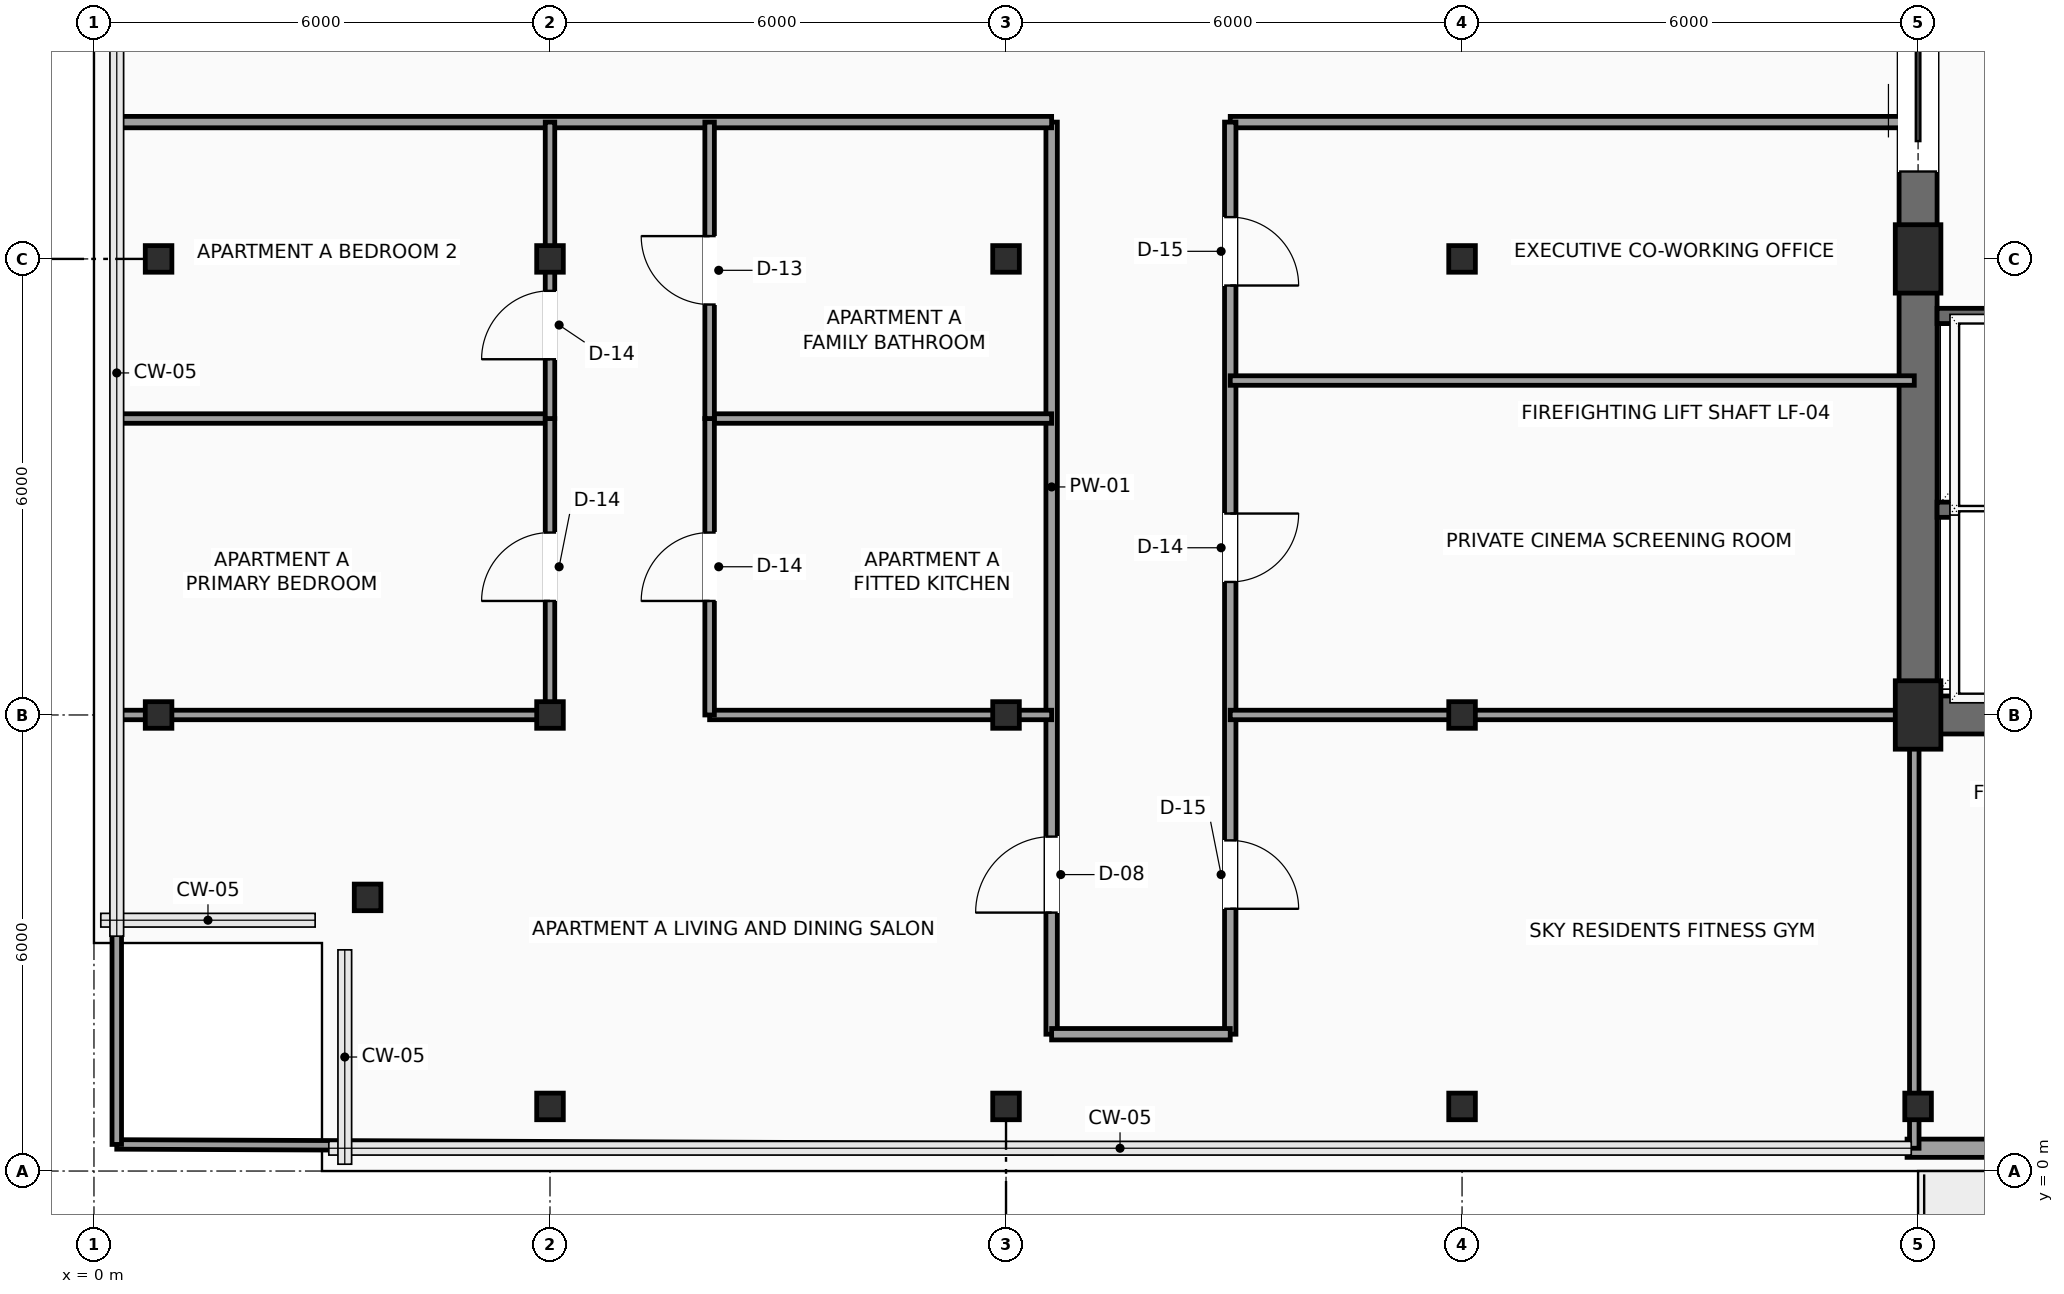
"""IFC4 building model, lengths in metres.
Left out: names, types, materials, properties, quantities, classifications, styles, units other than length and angle.
Written with IfcOpenShell. Run it as: python <this file> out.ifc"""

import sys

from ifc_helpers import new_model, si_unit, direction, frame, frame_2d, origin, origin_2d, place, context, subcontext, project, spatial, rectangle, hollow_rectangle, extrude, element, fill, save


model = new_model("IFC4")
c1 = context("Model", 3, precision=1e-05, world=origin(), true_north=direction((0.0, 1.0)))
c2 = subcontext(c1, "Body", "Model", "MODEL_VIEW")
j1 = project(units=[si_unit("LENGTHUNIT", "METRE"), si_unit("PLANEANGLEUNIT", "RADIAN")], contexts=[c1])
p1 = place(None, origin())
s1 = spatial("IfcSite", under=j1, at=p1, CompositionType="ELEMENT")
p2 = place(p1, origin())
s2 = spatial("IfcBuilding", under=s1, at=p2, CompositionType="ELEMENT")
p3 = place(p2, frame((0.0, 0.0, 260.7)))
s3 = spatial("IfcBuildingStorey", under=s2, at=p3, CompositionType="ELEMENT", Elevation=260.7)
for number, where, z_axis, x_axis in (
    (1, (24.0, 6.0, 0.0), (0.0, 0.0, 1.0), (1.0, 0.0, 0.0)),
    (2, (24.0, 12.0, 0.0), (0.0, 0.0, 1.0), (1.0, 0.0, 0.0)),
):
    element("IfcColumn", number, at=place(p3, frame(where, z_axis=z_axis, x_axis=x_axis)), inside=s3, PredefinedType="COLUMN", context=c2, shape_type="SweptSolid", body=[
        extrude(rectangle(XDim=0.6, YDim=0.9, at=origin_2d()), origin(), (0.0, 0.0, 1.0), 3.5),
    ])
for number, where, z_axis, x_axis in (
    (3, (3.6, 3.6, 0.0), (0.0, 0.0, 1.0), (1.0, 0.0, 0.0)),
    (4, (0.85, 6.0, 0.0), (0.0, 0.0, 1.0), (1.0, 0.0, 0.0)),
    (5, (0.85, 12.0, 0.0), (0.0, 0.0, 1.0), (1.0, 0.0, 0.0)),
    (6, (6.0, 0.85, 0.0), (0.0, 0.0, 1.0), (1.0, 0.0, 0.0)),
    (7, (6.0, 6.0, 0.0), (0.0, 0.0, 1.0), (1.0, 0.0, 0.0)),
    (8, (6.0, 12.0, 0.0), (0.0, 0.0, 1.0), (1.0, 0.0, 0.0)),
    (9, (12.0, 0.85, 0.0), (0.0, 0.0, 1.0), (1.0, 0.0, 0.0)),
    (10, (12.0, 6.0, 0.0), (0.0, 0.0, 1.0), (1.0, 0.0, 0.0)),
    (11, (12.0, 12.0, 0.0), (0.0, 0.0, 1.0), (1.0, 0.0, 0.0)),
    (12, (18.0, 0.85, 0.0), (0.0, 0.0, 1.0), (1.0, 0.0, 0.0)),
    (13, (18.0, 6.0, 0.0), (0.0, 0.0, 1.0), (1.0, 0.0, 0.0)),
    (14, (18.0, 12.0, 0.0), (0.0, 0.0, 1.0), (1.0, 0.0, 0.0)),
    (15, (24.0, 0.85, 0.0), (0.0, 0.0, 1.0), (1.0, 0.0, 0.0)),
):
    element("IfcColumn", number, at=place(p3, frame(where, z_axis=z_axis, x_axis=x_axis)), inside=s3, PredefinedType="COLUMN", context=c2, shape_type="SweptSolid", body=[
        extrude(hollow_rectangle(XDim=0.35, YDim=0.35, WallThickness=0.016, InnerFilletRadius=0.016, OuterFilletRadius=0.032, at=origin_2d()), origin(), (0.0, 0.0, 1.0), 3.5),
    ])
p4 = place(p3, frame((33.145, 0.3, 0.0), z_axis=(0.0, 0.0, 1.0), x_axis=(-1.0, 0.0, 0.0)))
e16 = element("IfcWall", 16, at=p4, inside=s3, PredefinedType="SOLIDWALL", context=c2, shape_type="SweptSolid", body=[
    extrude(rectangle(XDim=9.29, YDim=0.24, at=frame_2d((4.645, 0.0))), origin(), (0.0, 0.0, 1.0), 3.3),
])
p5 = place(p4, frame((3.945, 0.0, 0.0)))
e17 = element("IfcOpeningElement", 17, at=p5, cuts=e16, PredefinedType="OPENING", context=c2, shape_type="SweptSolid", body=[
    extrude(rectangle(XDim=1.05, YDim=2.2, at=frame_2d((0.525, 1.1))), frame((0.0, 0.13, 0.0), z_axis=(0.0, -1.0, 0.0), x_axis=(1.0, 0.0, 0.0)), (0.0, 0.0, 1.0), 0.26),
])
p6 = place(p4, frame((5.345, 0.0, 0.6)))
e18 = element("IfcOpeningElement", 18, at=p6, cuts=e16, PredefinedType="OPENING", context=c2, shape_type="SweptSolid", body=[
    extrude(rectangle(XDim=2.7, YDim=2.3, at=frame_2d((1.35, 1.15))), frame((0.0, 0.13, 0.0), z_axis=(0.0, -1.0, 0.0), x_axis=(1.0, 0.0, 0.0)), (0.0, 0.0, 1.0), 0.26),
])
p7 = place(p4, frame((1.4, 0.0, 0.6)))
e19 = element("IfcOpeningElement", 19, at=p7, cuts=e16, PredefinedType="OPENING", context=c2, shape_type="SweptSolid", body=[
    extrude(rectangle(XDim=0.9, YDim=2.2, at=frame_2d((0.45, 1.1))), frame((0.0, 0.13, 0.0), z_axis=(0.0, -1.0, 0.0), x_axis=(1.0, 0.0, 0.0)), (0.0, 0.0, 1.0), 0.26),
])
p8 = place(p3, frame((24.0, 6.0, 0.0), z_axis=(0.0, 0.0, 1.0), x_axis=(1.0, 0.0, 0.0)))
e20 = element("IfcWall", 20, at=p8, inside=s3, PredefinedType="SHEAR", context=c2, shape_type="SweptSolid", body=[
    extrude(rectangle(XDim=9.6, YDim=0.5, at=frame_2d((4.8, 0.0))), origin(), (0.0, 0.0, 1.0), 3.3),
])
p9 = place(p3, frame((24.0, 6.0, 0.0), z_axis=(0.0, 0.0, 1.0), x_axis=(0.0, 1.0, 0.0)))
e21 = element("IfcWall", 21, at=p9, inside=s3, PredefinedType="SHEAR", context=c2, shape_type="SweptSolid", body=[
    extrude(rectangle(XDim=12.0, YDim=0.5, at=frame_2d((6.0, 0.0))), origin(), (0.0, 0.0, 1.0), 3.3),
])
p10 = place(p9, frame((7.15, 0.0, 0.0)))
e22 = element("IfcOpeningElement", 22, at=p10, cuts=e21, PredefinedType="OPENING", context=c2, shape_type="SweptSolid", body=[
    extrude(rectangle(XDim=1.6, YDim=2.3, at=frame_2d((0.8, 1.15))), frame((0.0, 0.26, 0.0), z_axis=(0.0, -1.0, 0.0), x_axis=(1.0, 0.0, 0.0)), (0.0, 0.0, 1.0), 0.52),
])
for number, where, z_axis, x_axis in (
    (23, (24.25, 8.7, 0.0), (0.0, 0.0, 1.0), (1.0, 0.0, 0.0)),
    (24, (24.25, 11.25, 0.0), (0.0, 0.0, 1.0), (1.0, 0.0, 0.0)),
):
    element("IfcWall", number, at=place(p3, frame(where, z_axis=z_axis, x_axis=x_axis)), inside=s3, PredefinedType="SHEAR", context=c2, shape_type="SweptSolid", body=[
        extrude(rectangle(XDim=2.17, YDim=0.2, at=frame_2d((1.085, 0.0))), origin(), (0.0, 0.0, 1.0), 3.3),
    ])
p11 = place(p3, frame((12.6, 1.8, 0.0), z_axis=(0.0, 0.0, 1.0), x_axis=(0.0, 1.0, 0.0)))
e25 = element("IfcWall", 25, at=p11, inside=s3, PredefinedType="PARTITIONING", context=c2, shape_type="SweptSolid", body=[
    extrude(rectangle(XDim=12.0, YDim=0.15, at=frame_2d((6.0, 0.0))), origin(), (0.0, 0.0, 1.0), 3.3),
])
p12 = place(p11, frame((1.6, 0.0, 0.0)))
e26 = element("IfcOpeningElement", 26, at=p12, cuts=e25, PredefinedType="OPENING", context=c2, shape_type="SweptSolid", body=[
    extrude(rectangle(XDim=1.0, YDim=2.2, at=frame_2d((0.5, 1.1))), frame((0.0, 0.085, 0.0), z_axis=(0.0, -1.0, 0.0), x_axis=(1.0, 0.0, 0.0)), (0.0, 0.0, 1.0), 0.17),
])
p13 = place(p3, frame((12.6, 13.8, 0.0), z_axis=(0.0, 0.0, 1.0), x_axis=(-1.0, 0.0, 0.0)))
e27 = element("IfcWall", 27, at=p13, inside=s3, PredefinedType="PARTITIONING", context=c2, shape_type="SweptSolid", body=[
    extrude(rectangle(XDim=12.3, YDim=0.15, at=frame_2d((6.15, 0.0))), origin(), (0.0, 0.0, 1.0), 3.3),
])
p14 = place(p3, frame((23.95, 13.8, 0.0), z_axis=(0.0, 0.0, 1.0), x_axis=(-1.0, 0.0, 0.0)))
e28 = element("IfcWall", 28, at=p14, inside=s3, PredefinedType="PARTITIONING", context=c2, shape_type="SweptSolid", body=[
    extrude(rectangle(XDim=9.0, YDim=0.15, at=frame_2d((4.5, 0.0))), origin(), (0.0, 0.0, 1.0), 3.3),
])
p15 = place(p3, frame((14.95, 13.8, 0.0), z_axis=(0.0, 0.0, 1.0), x_axis=(0.0, -1.0, 0.0)))
e29 = element("IfcWall", 29, at=p15, inside=s3, PredefinedType="PARTITIONING", context=c2, shape_type="SweptSolid", body=[
    extrude(rectangle(XDim=12.0, YDim=0.15, at=frame_2d((6.0, 0.0))), origin(), (0.0, 0.0, 1.0), 3.3),
])
p16 = place(p15, frame((9.45, 0.0, 0.0)))
e30 = element("IfcOpeningElement", 30, at=p16, cuts=e29, PredefinedType="OPENING", context=c2, shape_type="SweptSolid", body=[
    extrude(rectangle(XDim=0.9, YDim=2.1, at=frame_2d((0.45, 1.05))), frame((0.0, 0.085, 0.0), z_axis=(0.0, -1.0, 0.0), x_axis=(1.0, 0.0, 0.0)), (0.0, 0.0, 1.0), 0.17),
])
p17 = place(p15, frame((5.15, 0.0, 0.0)))
e31 = element("IfcOpeningElement", 31, at=p17, cuts=e29, PredefinedType="OPENING", context=c2, shape_type="SweptSolid", body=[
    extrude(rectangle(XDim=0.9, YDim=2.1, at=frame_2d((0.45, 1.05))), frame((0.0, 0.085, 0.0), z_axis=(0.0, -1.0, 0.0), x_axis=(1.0, 0.0, 0.0)), (0.0, 0.0, 1.0), 0.17),
])
p18 = place(p15, frame((1.25, 0.0, 0.0)))
e32 = element("IfcOpeningElement", 32, at=p18, cuts=e29, PredefinedType="OPENING", context=c2, shape_type="SweptSolid", body=[
    extrude(rectangle(XDim=0.9, YDim=2.1, at=frame_2d((0.45, 1.05))), frame((0.0, 0.085, 0.0), z_axis=(0.0, -1.0, 0.0), x_axis=(1.0, 0.0, 0.0)), (0.0, 0.0, 1.0), 0.17),
])
p19 = place(p3, frame((14.95, 1.8, 0.0), z_axis=(0.0, 0.0, 1.0), x_axis=(-1.0, 0.0, 0.0)))
e33 = element("IfcWall", 33, at=p19, inside=s3, PredefinedType="PARTITIONING", context=c2, shape_type="SweptSolid", body=[
    extrude(rectangle(XDim=2.35, YDim=0.15, at=frame_2d((1.175, 0.0))), origin(), (0.0, 0.0, 1.0), 3.3),
])
p20 = place(p3, frame((0.3, 0.35, 0.0), z_axis=(0.0, 0.0, 1.0), x_axis=(0.999991721746, -0.00406896058, 0.0)))
e34 = element("IfcWall", 34, at=p20, inside=s3, PredefinedType="PARTITIONING", context=c2, shape_type="SweptSolid", body=[
    extrude(rectangle(XDim=12.3, YDim=0.125, at=frame_2d((6.15, 0.0))), origin(), (0.0, 0.0, 1.0), 3.3),
])
p21 = place(p3, frame((0.3, 0.35, 0.0), z_axis=(0.0, 0.0, 1.0), x_axis=(0.0, 1.0, 0.0)))
e35 = element("IfcWall", 35, at=p21, inside=s3, PredefinedType="PARTITIONING", context=c2, shape_type="SweptSolid", body=[
    extrude(rectangle(XDim=13.45, YDim=0.125, at=frame_2d((6.725, 0.0))), origin(), (0.0, 0.0, 1.0), 3.3),
])
p22 = place(p3, frame((8.1, 6.0, 0.0), z_axis=(0.0, 0.0, 1.0), x_axis=(1.0, 0.0, 0.0)))
e36 = element("IfcWall", 36, at=p22, inside=s3, PredefinedType="PARTITIONING", context=c2, shape_type="SweptSolid", body=[
    extrude(rectangle(XDim=4.5, YDim=0.125, at=frame_2d((2.25, 0.0))), origin(), (0.0, 0.0, 1.0), 2.992),
])
p23 = place(p3, frame((8.1, 9.9, 0.0), z_axis=(0.0, 0.0, 1.0), x_axis=(1.0, 0.0, 0.0)))
e37 = element("IfcWall", 37, at=p23, inside=s3, PredefinedType="PARTITIONING", context=c2, shape_type="SweptSolid", body=[
    extrude(rectangle(XDim=4.5, YDim=0.125, at=frame_2d((2.25, 0.0))), origin(), (0.0, 0.0, 1.0), 3.3),
])
p24 = place(p3, frame((8.1, 6.0, 0.0), z_axis=(0.0, 0.0, 1.0), x_axis=(0.0, 1.0, 0.0)))
e38 = element("IfcWall", 38, at=p24, inside=s3, PredefinedType="PARTITIONING", context=c2, shape_type="SweptSolid", body=[
    extrude(rectangle(XDim=3.9, YDim=0.125, at=frame_2d((1.95, 0.0))), origin(), (0.0, 0.0, 1.0), 3.3),
])
p25 = place(p24, frame((1.5, 0.0, 0.0)))
e39 = element("IfcOpeningElement", 39, at=p25, cuts=e38, PredefinedType="OPENING", context=c2, shape_type="SweptSolid", body=[
    extrude(rectangle(XDim=0.9, YDim=2.1, at=frame_2d((0.45, 1.05))), frame((0.0, 0.073, 0.0), z_axis=(0.0, -1.0, 0.0), x_axis=(1.0, 0.0, 0.0)), (0.0, 0.0, 1.0), 0.145),
])
p26 = place(p3, frame((8.1, 9.9, 0.0), z_axis=(0.0, 0.0, 1.0), x_axis=(0.0, 1.0, 0.0)))
e40 = element("IfcWall", 40, at=p26, inside=s3, PredefinedType="PARTITIONING", context=c2, shape_type="SweptSolid", body=[
    extrude(rectangle(XDim=3.9, YDim=0.125, at=frame_2d((1.95, 0.0))), origin(), (0.0, 0.0, 1.0), 3.3),
])
p27 = place(p26, frame((1.5, 0.0, 0.0)))
e41 = element("IfcOpeningElement", 41, at=p27, cuts=e40, PredefinedType="OPENING", context=c2, shape_type="SweptSolid", body=[
    extrude(rectangle(XDim=0.9, YDim=2.1, at=frame_2d((0.45, 1.05))), frame((0.0, 0.073, 0.0), z_axis=(0.0, -1.0, 0.0), x_axis=(1.0, 0.0, 0.0)), (0.0, 0.0, 1.0), 0.145),
])
p28 = place(p3, frame((0.3, 6.0, 0.0), z_axis=(0.0, 0.0, 1.0), x_axis=(1.0, 0.0, 0.0)))
e42 = element("IfcWall", 42, at=p28, inside=s3, PredefinedType="PARTITIONING", context=c2, shape_type="SweptSolid", body=[
    extrude(rectangle(XDim=5.7, YDim=0.125, at=frame_2d((2.85, 0.0))), origin(), (0.0, 0.0, 1.0), 2.992),
])
p29 = place(p3, frame((0.3, 9.9, 0.0), z_axis=(0.0, 0.0, 1.0), x_axis=(1.0, 0.0, 0.0)))
e43 = element("IfcWall", 43, at=p29, inside=s3, PredefinedType="PARTITIONING", context=c2, shape_type="SweptSolid", body=[
    extrude(rectangle(XDim=5.7, YDim=0.125, at=frame_2d((2.85, 0.0))), origin(), (0.0, 0.0, 1.0), 3.3),
])
p30 = place(p3, frame((6.0, 6.0, 0.0), z_axis=(0.0, 0.0, 1.0), x_axis=(0.0, 1.0, 0.0)))
e44 = element("IfcWall", 44, at=p30, inside=s3, PredefinedType="PARTITIONING", context=c2, shape_type="SweptSolid", body=[
    extrude(rectangle(XDim=3.9, YDim=0.125, at=frame_2d((1.95, 0.0))), origin(), (0.0, 0.0, 1.0), 2.992),
])
p31 = place(p30, frame((1.5, 0.0, 0.0)))
e45 = element("IfcOpeningElement", 45, at=p31, cuts=e44, PredefinedType="OPENING", context=c2, shape_type="SweptSolid", body=[
    extrude(rectangle(XDim=0.9, YDim=2.1, at=frame_2d((0.45, 1.05))), frame((0.0, 0.073, 0.0), z_axis=(0.0, -1.0, 0.0), x_axis=(1.0, 0.0, 0.0)), (0.0, 0.0, 1.0), 0.145),
])
p32 = place(p3, frame((6.0, 9.9, 0.0), z_axis=(0.0, 0.0, 1.0), x_axis=(0.0, 1.0, 0.0)))
e46 = element("IfcWall", 46, at=p32, inside=s3, PredefinedType="PARTITIONING", context=c2, shape_type="SweptSolid", body=[
    extrude(rectangle(XDim=3.9, YDim=0.125, at=frame_2d((1.95, 0.0))), origin(), (0.0, 0.0, 1.0), 2.992),
])
p33 = place(p32, frame((0.78, 0.0, 0.0)))
e47 = element("IfcOpeningElement", 47, at=p33, cuts=e46, PredefinedType="OPENING", context=c2, shape_type="SweptSolid", body=[
    extrude(rectangle(XDim=0.9, YDim=2.1, at=frame_2d((0.45, 1.05))), frame((0.0, 0.073, 0.0), z_axis=(0.0, -1.0, 0.0), x_axis=(1.0, 0.0, 0.0)), (0.0, 0.0, 1.0), 0.145),
])
p34 = place(p3, frame((14.95, 6.0, 0.0), z_axis=(0.0, 0.0, 1.0), x_axis=(1.0, 0.0, 0.0)))
e48 = element("IfcWall", 48, at=p34, inside=s3, PredefinedType="PARTITIONING", context=c2, shape_type="SweptSolid", body=[
    extrude(rectangle(XDim=9.0, YDim=0.125, at=frame_2d((4.5, 0.0))), origin(), (0.0, 0.0, 1.0), 2.992),
])
p35 = place(p3, frame((23.95, 0.3, 0.0), z_axis=(0.0, 0.0, 1.0), x_axis=(0.0, 1.0, 0.0)))
e49 = element("IfcWall", 49, at=p35, inside=s3, PredefinedType="PARTITIONING", context=c2, shape_type="SweptSolid", body=[
    extrude(rectangle(XDim=5.7, YDim=0.125, at=frame_2d((2.85, 0.0))), origin(), (0.0, 0.0, 1.0), 2.992),
])
p36 = place(p3, frame((14.95, 10.4, 0.0), z_axis=(0.0, 0.0, 1.0), x_axis=(1.0, 0.0, 0.0)))
e50 = element("IfcWall", 50, at=p36, inside=s3, PredefinedType="PARTITIONING", context=c2, shape_type="SweptSolid", body=[
    extrude(rectangle(XDim=9.0, YDim=0.125, at=frame_2d((4.5, 0.0))), origin(), (0.0, 0.0, 1.0), 3.3),
])
p37 = place(p10, origin())
e51 = element("IfcDoor", 51, at=p37, inside=s3, OperationType="DOUBLE_DOOR_SLIDING", PredefinedType="DOOR", context=c2, shape_type="SweptSolid", body=[
    extrude(rectangle(XDim=1.6, YDim=2.3, at=frame_2d((0.8, 1.15))), frame((0.0, 0.025, 0.0), z_axis=(0.0, -1.0, 0.0), x_axis=(1.0, 0.0, 0.0)), (0.0, 0.0, 1.0), 0.05),
])
fill(e22, e51)
p38 = place(p12, origin())
e52 = element("IfcDoor", 52, at=p38, inside=s3, OperationType="SINGLE_SWING_LEFT", PredefinedType="DOOR", context=c2, shape_type="SweptSolid", body=[
    extrude(rectangle(XDim=1.0, YDim=2.2, at=frame_2d((0.5, 1.1))), frame((0.0, 0.025, 0.0), z_axis=(0.0, -1.0, 0.0), x_axis=(1.0, 0.0, 0.0)), (0.0, 0.0, 1.0), 0.05),
])
fill(e26, e52)
p39 = place(p16, origin())
e53 = element("IfcDoor", 53, at=p39, inside=s3, OperationType="SINGLE_SWING_RIGHT", PredefinedType="DOOR", context=c2, shape_type="SweptSolid", body=[
    extrude(rectangle(XDim=0.9, YDim=2.1, at=frame_2d((0.45, 1.05))), frame((0.0, 0.025, 0.0), z_axis=(0.0, -1.0, 0.0), x_axis=(1.0, 0.0, 0.0)), (0.0, 0.0, 1.0), 0.05),
])
fill(e30, e53)
p40 = place(p17, origin())
e54 = element("IfcDoor", 54, at=p40, inside=s3, OperationType="SINGLE_SWING_LEFT", PredefinedType="DOOR", context=c2, shape_type="SweptSolid", body=[
    extrude(rectangle(XDim=0.9, YDim=2.1, at=frame_2d((0.45, 1.05))), frame((0.0, 0.025, 0.0), z_axis=(0.0, -1.0, 0.0), x_axis=(1.0, 0.0, 0.0)), (0.0, 0.0, 1.0), 0.05),
])
fill(e31, e54)
p41 = place(p18, origin())
e55 = element("IfcDoor", 55, at=p41, inside=s3, OperationType="SINGLE_SWING_RIGHT", PredefinedType="DOOR", context=c2, shape_type="SweptSolid", body=[
    extrude(rectangle(XDim=0.9, YDim=2.1, at=frame_2d((0.45, 1.05))), frame((0.0, 0.025, 0.0), z_axis=(0.0, -1.0, 0.0), x_axis=(1.0, 0.0, 0.0)), (0.0, 0.0, 1.0), 0.05),
])
fill(e32, e55)
p42 = place(p25, origin())
e56 = element("IfcDoor", 56, at=p42, inside=s3, OperationType="SINGLE_SWING_LEFT", PredefinedType="DOOR", context=c2, shape_type="SweptSolid", body=[
    extrude(rectangle(XDim=0.9, YDim=2.1, at=frame_2d((0.45, 1.05))), frame((0.0, 0.025, 0.0), z_axis=(0.0, -1.0, 0.0), x_axis=(1.0, 0.0, 0.0)), (0.0, 0.0, 1.0), 0.05),
])
fill(e39, e56)
p43 = place(p27, origin())
e57 = element("IfcDoor", 57, at=p43, inside=s3, OperationType="SINGLE_SWING_RIGHT", PredefinedType="DOOR", context=c2, shape_type="SweptSolid", body=[
    extrude(rectangle(XDim=0.9, YDim=2.1, at=frame_2d((0.45, 1.05))), frame((0.0, 0.025, 0.0), z_axis=(0.0, -1.0, 0.0), x_axis=(1.0, 0.0, 0.0)), (0.0, 0.0, 1.0), 0.05),
])
fill(e41, e57)
p44 = place(p31, origin())
e58 = element("IfcDoor", 58, at=p44, inside=s3, OperationType="SINGLE_SWING_LEFT", PredefinedType="DOOR", context=c2, shape_type="SweptSolid", body=[
    extrude(rectangle(XDim=0.9, YDim=2.1, at=frame_2d((0.45, 1.05))), frame((0.0, 0.025, 0.0), z_axis=(0.0, -1.0, 0.0), x_axis=(1.0, 0.0, 0.0)), (0.0, 0.0, 1.0), 0.05),
])
fill(e45, e58)
p45 = place(p33, origin())
e59 = element("IfcDoor", 59, at=p45, inside=s3, OperationType="SINGLE_SWING_LEFT", PredefinedType="DOOR", context=c2, shape_type="SweptSolid", body=[
    extrude(rectangle(XDim=0.9, YDim=2.1, at=frame_2d((0.45, 1.05))), frame((0.0, 0.025, 0.0), z_axis=(0.0, -1.0, 0.0), x_axis=(1.0, 0.0, 0.0)), (0.0, 0.0, 1.0), 0.05),
])
fill(e47, e59)
save(model, sys.argv[1])
